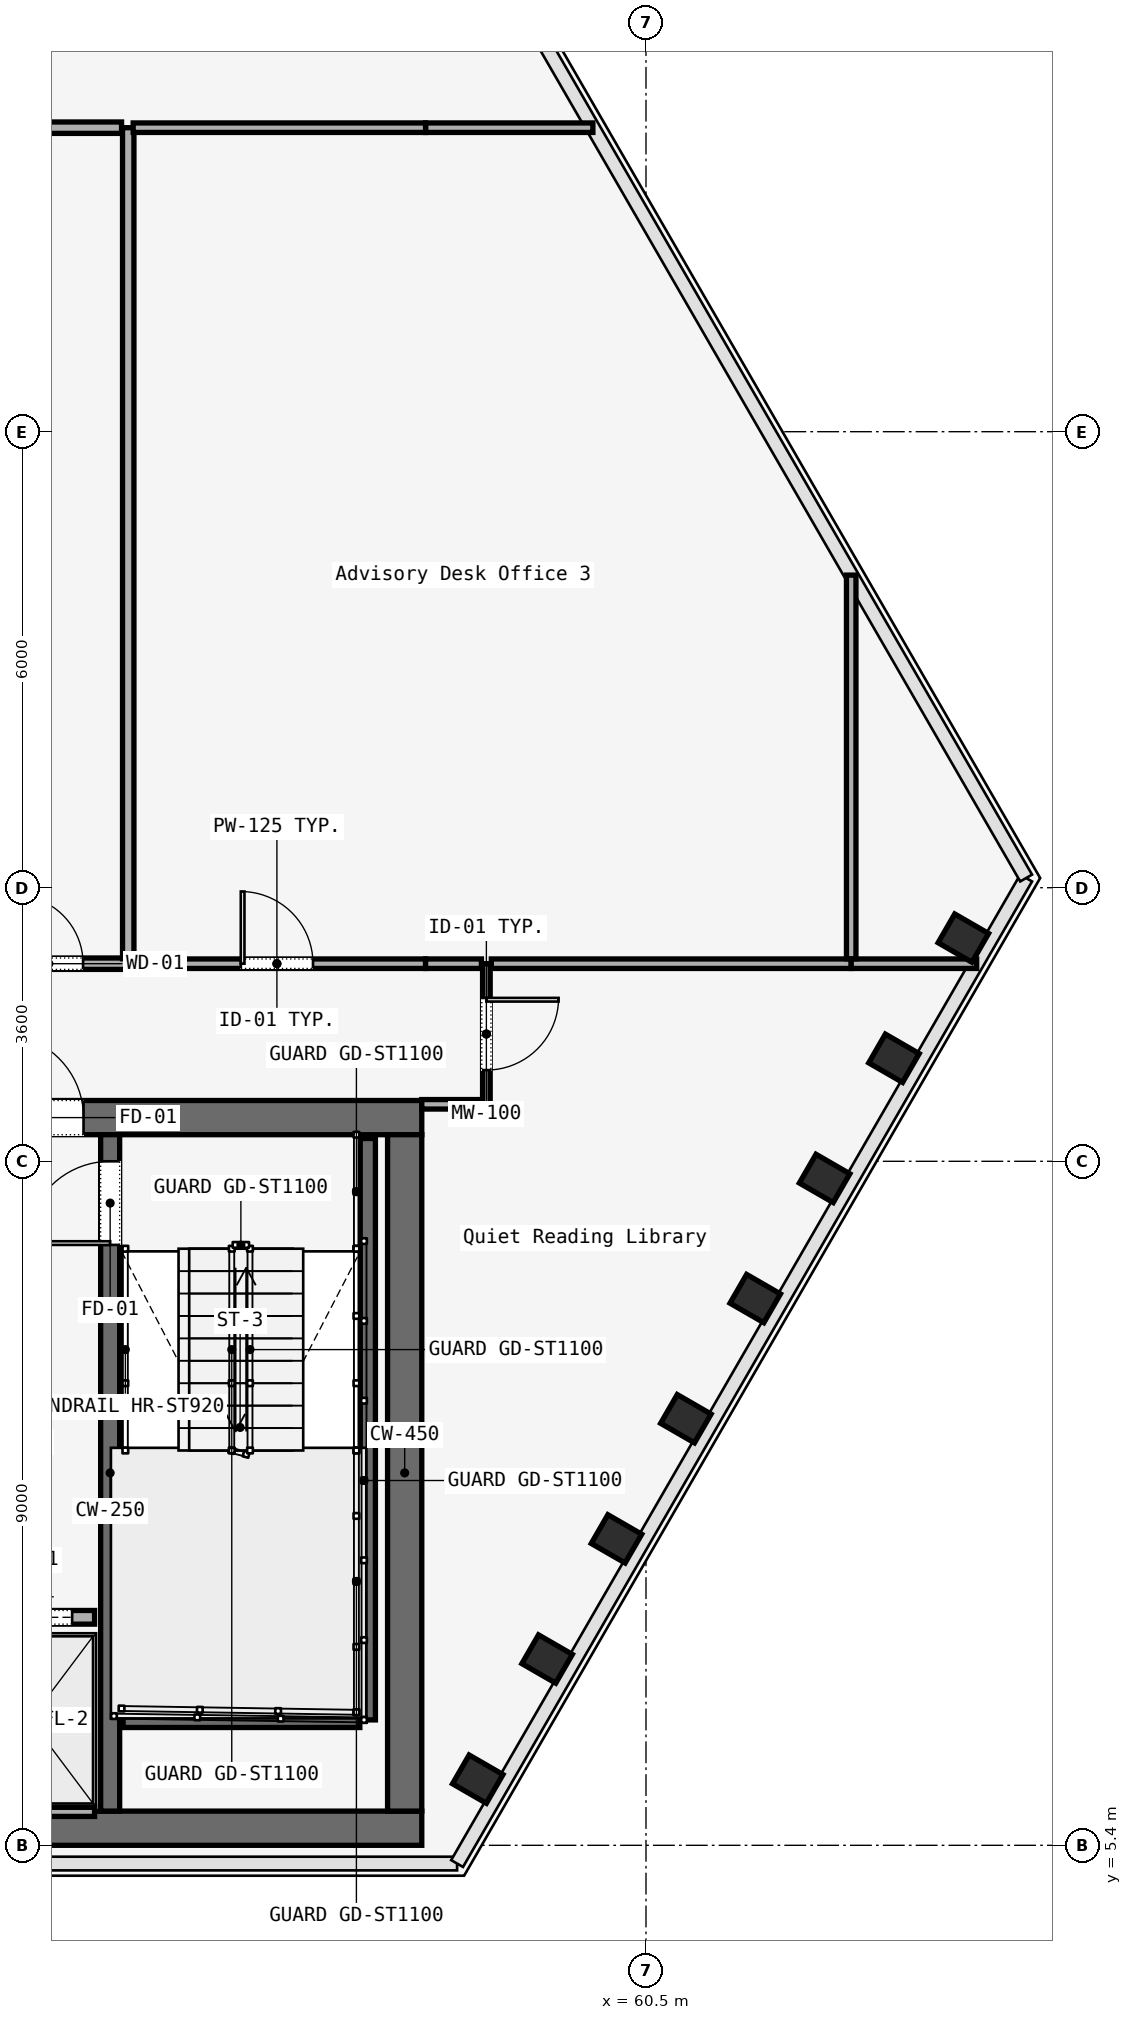
"""IFC4 building model, lengths in metres.
Left out: names, types, materials, properties, quantities, classifications, styles, units other than length and angle.
Written with IfcOpenShell. Run it as: python <this file> out.ifc"""

import sys

from ifc_helpers import new_model, si_unit, direction, frame, frame_2d, origin, origin_2d, place, context, subcontext, project, spatial, rectangle, i_section, extrude, element, fill, save


model = new_model("IFC4")
c1 = context("Model", 3, precision=1e-05, world=origin(), true_north=direction((0.0, 1.0)))
c2 = subcontext(c1, "Body", "Model", "MODEL_VIEW")
j1 = project(units=[si_unit("LENGTHUNIT", "METRE"), si_unit("PLANEANGLEUNIT", "RADIAN")], contexts=[c1])
p1 = place(None, origin())
s1 = spatial("IfcSite", under=j1, at=p1, CompositionType="ELEMENT")
p2 = place(p1, origin())
s2 = spatial("IfcBuilding", under=s1, at=p2, CompositionType="ELEMENT")
p3 = place(p2, frame((0.0, 0.0, 74.0)))
s3 = spatial("IfcBuildingStorey", under=s2, at=p3, CompositionType="ELEMENT", Elevation=74.0)
p4 = place(p3, frame((26.45, 14.975, 0.0), z_axis=(0.0, 0.0, 1.0), x_axis=(1.0, 0.0, 0.0)))
e1 = element("IfcWall", 1, at=p4, inside=s3, PredefinedType="SOLIDWALL", context=c2, shape_type="SweptSolid", body=[
    extrude(rectangle(XDim=31.1, YDim=0.45, at=frame_2d((15.55, 0.0))), origin(), (0.0, 0.0, 1.0), 3.58),
])
p5 = place(p4, frame((1.65, 0.0, 0.0)))
e2 = element("IfcOpeningElement", 2, at=p5, cuts=e1, PredefinedType="OPENING", context=c2, shape_type="SweptSolid", body=[
    extrude(rectangle(XDim=1.1, YDim=2.2, at=frame_2d((0.55, 1.1))), frame((0.0, 0.225, 0.0), z_axis=(0.0, -1.0, 0.0), x_axis=(1.0, 0.0, 0.0)), (0.0, 0.0, 1.0), 0.45),
])
p6 = place(p4, frame((13.65, 0.0, 0.0)))
e3 = element("IfcOpeningElement", 3, at=p6, cuts=e1, PredefinedType="OPENING", context=c2, shape_type="SweptSolid", body=[
    extrude(rectangle(XDim=1.1, YDim=2.2, at=frame_2d((0.55, 1.1))), frame((0.0, 0.225, 0.0), z_axis=(0.0, -1.0, 0.0), x_axis=(1.0, 0.0, 0.0)), (0.0, 0.0, 1.0), 0.45),
])
p7 = place(p4, frame((25.55, 0.0, 0.0)))
e4 = element("IfcOpeningElement", 4, at=p7, cuts=e1, PredefinedType="OPENING", context=c2, shape_type="SweptSolid", body=[
    extrude(rectangle(XDim=1.1, YDim=2.2, at=frame_2d((0.55, 1.1))), frame((0.0, 0.225, 0.0), z_axis=(0.0, -1.0, 0.0), x_axis=(1.0, 0.0, 0.0)), (0.0, 0.0, 1.0), 0.45),
])
p8 = place(p4, frame((10.7, 0.0, 0.0)))
e5 = element("IfcOpeningElement", 5, at=p8, cuts=e1, PredefinedType="OPENING", context=c2, shape_type="SweptSolid", body=[
    extrude(rectangle(XDim=1.4, YDim=2.2, at=frame_2d((0.7, 1.1))), frame((0.0, 0.225, 0.0), z_axis=(0.0, -1.0, 0.0), x_axis=(1.0, 0.0, 0.0)), (0.0, 0.0, 1.0), 0.45),
])
p9 = place(p4, frame((19.35, 0.0, 0.0)))
e6 = element("IfcOpeningElement", 6, at=p9, cuts=e1, PredefinedType="OPENING", context=c2, shape_type="SweptSolid", body=[
    extrude(rectangle(XDim=1.1, YDim=2.2, at=frame_2d((0.55, 1.1))), frame((0.0, 0.225, 0.0), z_axis=(0.0, -1.0, 0.0), x_axis=(1.0, 0.0, 0.0)), (0.0, 0.0, 1.0), 0.45),
])
p10 = place(p4, frame((21.4, 0.0, 0.0)))
e7 = element("IfcOpeningElement", 7, at=p10, cuts=e1, PredefinedType="OPENING", context=c2, shape_type="SweptSolid", body=[
    extrude(rectangle(XDim=0.9, YDim=2.1, at=frame_2d((0.45, 1.05))), frame((0.0, 0.225, 0.0), z_axis=(0.0, -1.0, 0.0), x_axis=(1.0, 0.0, 0.0)), (0.0, 0.0, 1.0), 0.45),
])
p11 = place(p4, frame((23.35, 0.0, 0.0)))
e8 = element("IfcOpeningElement", 8, at=p11, cuts=e1, PredefinedType="OPENING", context=c2, shape_type="SweptSolid", body=[
    extrude(rectangle(XDim=1.3, YDim=2.3, at=frame_2d((0.65, 1.15))), frame((0.0, 0.225, 0.0), z_axis=(0.0, -1.0, 0.0), x_axis=(1.0, 0.0, 0.0)), (0.0, 0.0, 1.0), 0.45),
])
p12 = place(p3, frame((26.45, 5.625, 0.0), z_axis=(0.0, 0.0, 1.0), x_axis=(1.0, 0.0, 0.0)))
e9 = element("IfcWall", 9, at=p12, inside=s3, PredefinedType="SOLIDWALL", context=c2, shape_type="SweptSolid", body=[
    extrude(rectangle(XDim=31.1, YDim=0.45, at=frame_2d((15.55, 0.0))), origin(), (0.0, 0.0, 1.0), 3.58),
])
p13 = place(p3, frame((57.325, 5.85, 0.0), z_axis=(0.0, 0.0, 1.0), x_axis=(0.0, 1.0, 0.0)))
e10 = element("IfcWall", 10, at=p13, inside=s3, PredefinedType="SOLIDWALL", context=c2, shape_type="SweptSolid", body=[
    extrude(rectangle(XDim=8.9, YDim=0.45, at=frame_2d((4.45, 0.0))), origin(), (0.0, 0.0, 1.0), 3.58),
])
p14 = place(p3, frame((53.45, 5.85, 0.0), z_axis=(0.0, 0.0, 1.0), x_axis=(0.0, 1.0, 0.0)))
e11 = element("IfcWall", 11, at=p14, inside=s3, PredefinedType="SOLIDWALL", context=c2, shape_type="SweptSolid", body=[
    extrude(rectangle(XDim=8.9, YDim=0.25, at=frame_2d((4.45, 0.0))), origin(), (0.0, 0.0, 1.0), 3.58),
])
p15 = place(p14, frame((7.45, 0.0, 0.0)))
e12 = element("IfcOpeningElement", 12, at=p15, cuts=e11, PredefinedType="OPENING", context=c2, shape_type="SweptSolid", body=[
    extrude(rectangle(XDim=1.1, YDim=2.2, at=frame_2d((0.55, 1.1))), frame((0.0, 0.125, 0.0), z_axis=(0.0, -1.0, 0.0), x_axis=(1.0, 0.0, 0.0)), (0.0, 0.0, 1.0), 0.25),
])
for number, where, z_axis, x_axis in (
    (13, (58.287, 6.271, 0.0), (0.0, 0.0, 1.0), (0.5, 0.866, 0.0)),
    (14, (59.199, 7.851, 0.0), (0.0, 0.0, 1.0), (0.5, 0.866, 0.0)),
    (15, (60.112, 9.432, 0.0), (0.0, 0.0, 1.0), (0.5, 0.866, 0.0)),
    (16, (61.025, 11.013, 0.0), (0.0, 0.0, 1.0), (0.5, 0.866, 0.0)),
    (17, (61.938, 12.594, 0.0), (0.0, 0.0, 1.0), (0.5, 0.866, 0.0)),
    (18, (62.85, 14.175, 0.0), (0.0, 0.0, 1.0), (0.5, 0.866, 0.0)),
    (19, (63.763, 15.756, 0.0), (0.0, 0.0, 1.0), (0.5, 0.866, 0.0)),
    (20, (64.676, 17.337, 0.0), (0.0, 0.0, 1.0), (0.5, 0.866, 0.0)),
):
    element("IfcColumn", number, at=place(p3, frame(where, z_axis=z_axis, x_axis=x_axis)), inside=s3, PredefinedType="COLUMN", context=c2, shape_type="SweptSolid", body=[
        extrude(i_section(OverallWidth=0.437, OverallDepth=0.514, WebThickness=0.061, FlangeThickness=0.077, FilletRadius=0.015, at=origin_2d()), origin(), (0.0, 0.0, 1.0), 3.58),
    ])
p16 = place(p3, frame((56.84, 14.7, 0.0), z_axis=(0.0, 0.0, 1.0), x_axis=(0.0, -1.0, 0.0)))
e21 = element("IfcWall", 21, at=p16, inside=s3, PredefinedType="SOLIDWALL", context=c2, shape_type="SweptSolid", body=[
    extrude(rectangle(XDim=7.65, YDim=0.2, at=frame_2d((3.825, 0.0))), origin(), (0.0, 0.0, 1.0), 3.8),
])
p17 = place(p3, frame((53.62, 7.05, 0.0), z_axis=(0.0, 0.0, 1.0), x_axis=(1.0, 0.0, 0.0)))
e22 = element("IfcWall", 22, at=p17, inside=s3, PredefinedType="SOLIDWALL", context=c2, shape_type="SweptSolid", body=[
    extrude(rectangle(XDim=3.115, YDim=0.2, at=frame_2d((1.558, 0.0))), origin(), (0.0, 0.0, 1.0), 3.8),
])
p18 = place(p3, frame((51.555, 8.4, 0.0), z_axis=(0.0, 0.0, 1.0), x_axis=(1.0, 0.0, 0.0)))
e23 = element("IfcWall", 23, at=p18, inside=s3, PredefinedType="SOLIDWALL", context=c2, shape_type="SweptSolid", body=[
    extrude(rectangle(XDim=1.69, YDim=0.18, at=frame_2d((0.845, 0.0))), origin(), (0.0, 0.0, 1.0), 2.95),
])
p19 = place(p18, frame((0.295, 0.0, 0.0)))
e24 = element("IfcOpeningElement", 24, at=p19, cuts=e23, PredefinedType="OPENING", context=c2, shape_type="SweptSolid", body=[
    extrude(rectangle(XDim=1.1, YDim=2.2, at=frame_2d((0.55, 1.1))), frame((0.0, 0.09, 0.0), z_axis=(0.0, -1.0, 0.0), x_axis=(1.0, 0.0, 0.0)), (0.0, 0.0, 1.0), 0.18),
])
p20 = place(p3, frame((51.555, 5.84, 0.0), z_axis=(0.0, 0.0, 1.0), x_axis=(1.0, 0.0, 0.0)))
e25 = element("IfcWall", 25, at=p20, inside=s3, PredefinedType="SOLIDWALL", context=c2, shape_type="SweptSolid", body=[
    extrude(rectangle(XDim=1.69, YDim=0.12, at=frame_2d((0.845, 0.0))), origin(), (0.0, 0.0, 1.0), 2.95),
])
p21 = place(p3, frame((58.4, 17.0, 0.0), z_axis=(0.0, 0.0, 1.0), x_axis=(0.0, -1.0, 0.0)))
e26 = element("IfcWall", 26, at=p21, inside=s3, PredefinedType="MOVABLE", context=c2, shape_type="SweptSolid", body=[
    extrude(rectangle(XDim=1.85, YDim=0.1, at=frame_2d((0.925, 0.0))), origin(), (0.0, 0.0, 1.0), 2.95),
])
p22 = place(p21, frame((0.45, 0.0, 0.0)))
e27 = element("IfcOpeningElement", 27, at=p22, cuts=e26, PredefinedType="OPENING", context=c2, shape_type="SweptSolid", body=[
    extrude(rectangle(XDim=0.95, YDim=2.2, at=frame_2d((0.475, 1.1))), frame((0.0, 0.05, 0.0), z_axis=(0.0, -1.0, 0.0), x_axis=(1.0, 0.0, 0.0)), (0.0, 0.0, 1.0), 0.1),
])
p23 = place(p3, frame((58.335, 15.15, 0.0), z_axis=(0.0, 0.0, 1.0), x_axis=(-1.0, 0.0, 0.0)))
e28 = element("IfcWall", 28, at=p23, inside=s3, PredefinedType="PARTITIONING", context=c2, shape_type="SweptSolid", body=[
    extrude(rectangle(XDim=0.785, YDim=0.125, at=frame_2d((0.393, 0.0))), origin(), (0.0, 0.0, 1.0), 2.95),
])
p24 = place(p3, frame((51.6, 17.0, 0.0), z_axis=(0.0, 0.0, 1.0), x_axis=(1.0, 0.0, 0.0)))
e29 = element("IfcWall", 29, at=p24, inside=s3, PredefinedType="PARTITIONING", context=c2, shape_type="SweptSolid", body=[
    extrude(rectangle(XDim=2.088, YDim=0.15, at=frame_2d((1.044, 0.0))), origin(), (0.0, 0.0, 1.0), 2.95),
])
p25 = place(p24, frame((0.594, 0.0, 0.0)))
e30 = element("IfcOpeningElement", 30, at=p25, cuts=e29, PredefinedType="OPENING", context=c2, shape_type="SweptSolid", body=[
    extrude(rectangle(XDim=0.9, YDim=2.15, at=frame_2d((0.45, 1.075))), frame((0.0, 0.075, 0.0), z_axis=(0.0, -1.0, 0.0), x_axis=(1.0, 0.0, 0.0)), (0.0, 0.0, 1.0), 0.15),
])
p26 = place(p3, frame((53.688, 17.0, 0.0), z_axis=(0.0, 0.0, 1.0), x_axis=(1.0, 0.0, 0.0)))
e31 = element("IfcWall", 31, at=p26, inside=s3, PredefinedType="PARTITIONING", context=c2, shape_type="SweptSolid", body=[
    extrude(rectangle(XDim=3.912, YDim=0.125, at=frame_2d((1.956, 0.0))), origin(), (0.0, 0.0, 1.0), 2.95),
])
p27 = place(p26, frame((1.481, 0.0, 0.0)))
e32 = element("IfcOpeningElement", 32, at=p27, cuts=e31, PredefinedType="OPENING", context=c2, shape_type="SweptSolid", body=[
    extrude(rectangle(XDim=0.95, YDim=2.2, at=frame_2d((0.475, 1.1))), frame((0.0, 0.062, 0.0), z_axis=(0.0, -1.0, 0.0), x_axis=(1.0, 0.0, 0.0)), (0.0, 0.0, 1.0), 0.125),
])
p28 = place(p3, frame((57.6, 17.0, 0.0), z_axis=(0.0, 0.0, 1.0), x_axis=(1.0, 0.0, 0.0)))
e33 = element("IfcWall", 33, at=p28, inside=s3, PredefinedType="PARTITIONING", context=c2, shape_type="SweptSolid", body=[
    extrude(rectangle(XDim=0.735, YDim=0.125, at=frame_2d((0.367, 0.0))), origin(), (0.0, 0.0, 1.0), 2.95),
])
p29 = place(p3, frame((58.465, 17.0, 0.0), z_axis=(0.0, 0.0, 1.0), x_axis=(1.0, 0.0, 0.0)))
e34 = element("IfcWall", 34, at=p29, inside=s3, PredefinedType="PARTITIONING", context=c2, shape_type="SweptSolid", body=[
    extrude(rectangle(XDim=4.735, YDim=0.125, at=frame_2d((2.367, 0.0))), origin(), (0.0, 0.0, 1.0), 2.95),
])
p30 = place(p3, frame((63.2, 17.0, 0.0), z_axis=(0.0, 0.0, 1.0), x_axis=(1.0, 0.0, 0.0)))
e35 = element("IfcWall", 35, at=p30, inside=s3, PredefinedType="PARTITIONING", context=c2, shape_type="SweptSolid", body=[
    extrude(rectangle(XDim=1.651, YDim=0.125, at=frame_2d((0.825, 0.0))), origin(), (0.0, 0.0, 1.0), 2.95),
])
p31 = place(p3, frame((57.6, 28.0, 0.0), z_axis=(0.0, 0.0, 1.0), x_axis=(1.0, 0.0, 0.0)))
e36 = element("IfcWall", 36, at=p31, inside=s3, PredefinedType="PARTITIONING", context=c2, shape_type="SweptSolid", body=[
    extrude(rectangle(XDim=2.201, YDim=0.125, at=frame_2d((1.101, 0.0))), origin(), (0.0, 0.0, 1.0), 2.95),
])
p32 = place(p3, frame((63.2, 22.113, 0.0), z_axis=(0.0, 0.0, 1.0), x_axis=(0.0, -1.0, 0.0)))
e37 = element("IfcWall", 37, at=p32, inside=s3, PredefinedType="PARTITIONING", context=c2, shape_type="SweptSolid", body=[
    extrude(rectangle(XDim=5.048, YDim=0.125, at=frame_2d((2.524, 0.0))), origin(), (0.0, 0.0, 1.0), 2.95),
])
p33 = place(p3, frame((53.688, 17.065, 0.0), z_axis=(0.0, 0.0, 1.0), x_axis=(0.0, 1.0, 0.0)))
e38 = element("IfcWall", 38, at=p33, inside=s3, PredefinedType="PARTITIONING", context=c2, shape_type="SweptSolid", body=[
    extrude(rectangle(XDim=10.935, YDim=0.15, at=frame_2d((5.468, 0.0))), origin(), (0.0, 0.0, 1.0), 2.95),
])
p34 = place(p3, frame((53.753, 28.0, 0.0), z_axis=(0.0, 0.0, 1.0), x_axis=(1.0, 0.0, 0.0)))
e39 = element("IfcWall", 39, at=p34, inside=s3, PredefinedType="PARTITIONING", context=c2, shape_type="SweptSolid", body=[
    extrude(rectangle(XDim=3.847, YDim=0.125, at=frame_2d((1.924, 0.0))), origin(), (0.0, 0.0, 1.0), 2.95),
])
p35 = place(p3, frame((51.6, 28.0, 0.0), z_axis=(0.0, 0.0, 1.0), x_axis=(1.0, 0.0, 0.0)))
e40 = element("IfcWall", 40, at=p35, inside=s3, PredefinedType="PARTITIONING", context=c2, shape_type="SweptSolid", body=[
    extrude(rectangle(XDim=2.0, YDim=0.15, at=frame_2d((1.0, 0.0))), origin(), (0.0, 0.0, 1.0), 2.95),
])
p36 = place(p7, origin())
e41 = element("IfcDoor", 41, at=p36, inside=s3, OperationType="SINGLE_SWING_RIGHT", PredefinedType="DOOR", context=c2, shape_type="SweptSolid", body=[
    extrude(rectangle(XDim=1.1, YDim=2.2, at=frame_2d((0.55, 1.1))), frame((0.0, 0.025, 0.0), z_axis=(0.0, -1.0, 0.0), x_axis=(1.0, 0.0, 0.0)), (0.0, 0.0, 1.0), 0.05),
])
fill(e4, e41)
p37 = place(p15, origin())
e42 = element("IfcDoor", 42, at=p37, inside=s3, OperationType="SINGLE_SWING_LEFT", PredefinedType="DOOR", context=c2, shape_type="SweptSolid", body=[
    extrude(rectangle(XDim=1.1, YDim=2.2, at=frame_2d((0.55, 1.1))), frame((0.0, 0.025, 0.0), z_axis=(0.0, -1.0, 0.0), x_axis=(1.0, 0.0, 0.0)), (0.0, 0.0, 1.0), 0.05),
])
fill(e12, e42)
p38 = place(p19, origin())
e43 = element("IfcDoor", 43, at=p38, inside=s3, OperationType="SLIDING_TO_LEFT", PredefinedType="DOOR", context=c2, shape_type="SweptSolid", body=[
    extrude(rectangle(XDim=1.1, YDim=2.2, at=frame_2d((0.55, 1.1))), frame((0.0, 0.025, 0.0), z_axis=(0.0, -1.0, 0.0), x_axis=(1.0, 0.0, 0.0)), (0.0, 0.0, 1.0), 0.05),
])
fill(e24, e43)
p39 = place(p22, origin())
e44 = element("IfcDoor", 44, at=p39, inside=s3, OperationType="SINGLE_SWING_RIGHT", PredefinedType="DOOR", context=c2, shape_type="SweptSolid", body=[
    extrude(rectangle(XDim=0.95, YDim=2.2, at=frame_2d((0.475, 1.1))), frame((0.0, 0.025, 0.0), z_axis=(0.0, -1.0, 0.0), x_axis=(1.0, 0.0, 0.0)), (0.0, 0.0, 1.0), 0.05),
])
fill(e27, e44)
p40 = place(p27, origin())
e45 = element("IfcDoor", 45, at=p40, inside=s3, OperationType="SINGLE_SWING_RIGHT", PredefinedType="DOOR", context=c2, shape_type="SweptSolid", body=[
    extrude(rectangle(XDim=0.95, YDim=2.2, at=frame_2d((0.475, 1.1))), frame((0.0, 0.025, 0.0), z_axis=(0.0, -1.0, 0.0), x_axis=(1.0, 0.0, 0.0)), (0.0, 0.0, 1.0), 0.05),
])
fill(e32, e45)
p41 = place(p25, origin())
e46 = element("IfcDoor", 46, at=p41, inside=s3, OperationType="SINGLE_SWING_LEFT", PredefinedType="DOOR", context=c2, shape_type="SweptSolid", body=[
    extrude(rectangle(XDim=0.9, YDim=2.15, at=frame_2d((0.45, 1.075))), frame((0.0, 0.025, 0.0), z_axis=(0.0, -1.0, 0.0), x_axis=(1.0, 0.0, 0.0)), (0.0, 0.0, 1.0), 0.05),
])
fill(e30, e46)
save(model, sys.argv[1])
